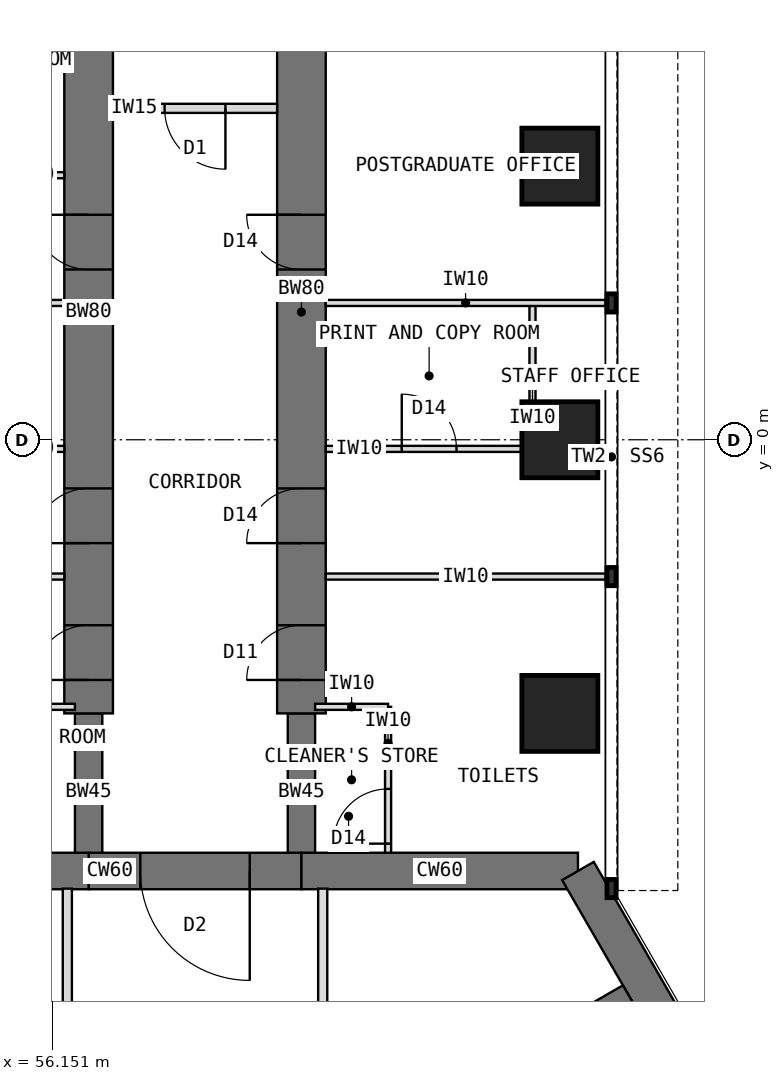
"""IFC4 building model, lengths in metres.
Left out: names, types, materials, properties, quantities, classifications, styles, units other than length and angle.
Written with IfcOpenShell. Run it as: python <this file> out.ifc"""

import sys

from ifc_helpers import new_model, si_unit, direction, frame, frame_2d, origin, origin_2d, place, context, subcontext, project, spatial, rectangle, extrude, element, fill, save


model = new_model("IFC4")
c1 = context("Model", 3, precision=1e-05, world=origin(), true_north=direction((0.0, 1.0)))
c2 = subcontext(c1, "Body", "Model", "MODEL_VIEW")
j1 = project(units=[si_unit("LENGTHUNIT", "METRE"), si_unit("PLANEANGLEUNIT", "RADIAN")], contexts=[c1])
p1 = place(None, origin())
s1 = spatial("IfcSite", under=j1, at=p1, CompositionType="ELEMENT")
p2 = place(p1, origin())
s2 = spatial("IfcBuilding", under=s1, at=p2, CompositionType="ELEMENT")
p3 = place(p2, frame((0.0, 0.0, 157.5)))
s3 = spatial("IfcBuildingStorey", under=s2, at=p3, CompositionType="ELEMENT", Elevation=157.5)
p4 = place(p3, frame((64.798, -7.092, 0.0), z_axis=(0.0, 0.0, 1.0), x_axis=(-1.0, 0.0, 0.0)))
e1 = element("IfcWall", 1, at=p4, inside=s3, PredefinedType="SHEAR", context=c2, shape_type="SweptSolid", body=[
    extrude(rectangle(XDim=4.548, YDim=0.6, at=frame_2d((2.274, 0.0))), origin(), (0.0, 0.0, 1.0), 4.0),
])
p5 = place(p3, frame((60.25, -7.092, 0.0), z_axis=(0.0, 0.0, 1.0), x_axis=(-1.0, 0.0, 0.0)))
e2 = element("IfcWall", 2, at=p5, inside=s3, PredefinedType="SHEAR", context=c2, shape_type="SweptSolid", body=[
    extrude(rectangle(XDim=3.5, YDim=0.6, at=frame_2d((1.75, 0.0))), origin(), (0.0, 0.0, 1.0), 4.0),
])
p6 = place(p5, frame((0.85, 0.0, 0.0)))
e3 = element("IfcOpeningElement", 3, at=p6, cuts=e2, PredefinedType="OPENING", context=c2, shape_type="SweptSolid", body=[
    extrude(rectangle(XDim=1.8, YDim=2.1, at=frame_2d((0.9, 1.05))), frame((0.0, 0.31, 0.0), z_axis=(0.0, -1.0, 0.0), x_axis=(1.0, 0.0, 0.0)), (0.0, 0.0, 1.0), 0.62),
])
p7 = place(p3, frame((56.75, -7.092, 0.0), z_axis=(0.0, 0.0, 1.0), x_axis=(-1.0, 0.0, 0.0)))
e4 = element("IfcWall", 4, at=p7, inside=s3, PredefinedType="SHEAR", context=c2, shape_type="SweptSolid", body=[
    extrude(rectangle(XDim=4.548, YDim=0.6, at=frame_2d((2.274, 0.0))), origin(), (0.0, 0.0, 1.0), 4.0),
])
p8 = place(p3, frame((71.096, -18.0, 0.0), z_axis=(0.0, 0.0, 1.0), x_axis=(-0.500005998175, 0.866021940709, 0.0)))
e5 = element("IfcWall", 5, at=p8, inside=s3, PredefinedType="SHEAR", context=c2, shape_type="SweptSolid", body=[
    extrude(rectangle(XDim=12.596, YDim=0.6, at=frame_2d((6.298, 0.0))), origin(), (0.0, 0.0, 1.0), 4.0),
])
p9 = place(p3, frame((56.75, -7.092, 0.0), z_axis=(0.0, 0.0, 1.0), x_axis=(0.0, 1.0, 0.0)))
e6 = element("IfcWall", 6, at=p9, inside=s3, PredefinedType="SHEAR", context=c2, shape_type="SweptSolid", body=[
    extrude(rectangle(XDim=2.592, YDim=0.45, at=frame_2d((1.296, 0.0))), origin(), (0.0, 0.0, 1.0), 4.0),
])
p10 = place(p3, frame((56.75, -4.5, 0.0), z_axis=(0.0, 0.0, 1.0), x_axis=(0.0, 1.0, 0.0)))
e7 = element("IfcWall", 7, at=p10, inside=s3, PredefinedType="SHEAR", context=c2, shape_type="SweptSolid", body=[
    extrude(rectangle(XDim=13.2, YDim=0.8, at=frame_2d((6.6, 0.0))), origin(), (0.0, 0.0, 1.0), 4.0),
])
p11 = place(p10, frame((0.55, 0.0, 0.0)))
e8 = element("IfcOpeningElement", 8, at=p11, cuts=e7, PredefinedType="OPENING", context=c2, shape_type="SweptSolid", body=[
    extrude(rectangle(XDim=0.9, YDim=2.1, at=frame_2d((0.45, 1.05))), frame((0.0, 0.41, 0.0), z_axis=(0.0, -1.0, 0.0), x_axis=(1.0, 0.0, 0.0)), (0.0, 0.0, 1.0), 0.82),
])
p12 = place(p10, frame((2.8, 0.0, 0.0)))
e9 = element("IfcOpeningElement", 9, at=p12, cuts=e7, PredefinedType="OPENING", context=c2, shape_type="SweptSolid", body=[
    extrude(rectangle(XDim=0.9, YDim=2.1, at=frame_2d((0.45, 1.05))), frame((0.0, 0.41, 0.0), z_axis=(0.0, -1.0, 0.0), x_axis=(1.0, 0.0, 0.0)), (0.0, 0.0, 1.0), 0.82),
])
p13 = place(p10, frame((7.3, 0.0, 0.0)))
e10 = element("IfcOpeningElement", 10, at=p13, cuts=e7, PredefinedType="OPENING", context=c2, shape_type="SweptSolid", body=[
    extrude(rectangle(XDim=0.9, YDim=2.1, at=frame_2d((0.45, 1.05))), frame((0.0, 0.41, 0.0), z_axis=(0.0, -1.0, 0.0), x_axis=(1.0, 0.0, 0.0)), (0.0, 0.0, 1.0), 0.82),
])
p14 = place(p3, frame((60.25, -7.092, 0.0), z_axis=(0.0, 0.0, 1.0), x_axis=(0.0, 1.0, 0.0)))
e11 = element("IfcWall", 11, at=p14, inside=s3, PredefinedType="SHEAR", context=c2, shape_type="SweptSolid", body=[
    extrude(rectangle(XDim=2.592, YDim=0.45, at=frame_2d((1.296, 0.0))), origin(), (0.0, 0.0, 1.0), 4.0),
])
p15 = place(p3, frame((60.25, -4.5, 0.0), z_axis=(0.0, 0.0, 1.0), x_axis=(0.0, 1.0, 0.0)))
e12 = element("IfcWall", 12, at=p15, inside=s3, PredefinedType="SHEAR", context=c2, shape_type="SweptSolid", body=[
    extrude(rectangle(XDim=13.2, YDim=0.8, at=frame_2d((6.6, 0.0))), origin(), (0.0, 0.0, 1.0), 4.0),
])
p16 = place(p15, frame((0.55, 0.0, 0.0)))
e13 = element("IfcOpeningElement", 13, at=p16, cuts=e12, PredefinedType="OPENING", context=c2, shape_type="SweptSolid", body=[
    extrude(rectangle(XDim=0.9, YDim=2.1, at=frame_2d((0.45, 1.05))), frame((0.0, 0.41, 0.0), z_axis=(0.0, -1.0, 0.0), x_axis=(1.0, 0.0, 0.0)), (0.0, 0.0, 1.0), 0.82),
])
p17 = place(p15, frame((2.8, 0.0, 0.0)))
e14 = element("IfcOpeningElement", 14, at=p17, cuts=e12, PredefinedType="OPENING", context=c2, shape_type="SweptSolid", body=[
    extrude(rectangle(XDim=0.9, YDim=2.1, at=frame_2d((0.45, 1.05))), frame((0.0, 0.41, 0.0), z_axis=(0.0, -1.0, 0.0), x_axis=(1.0, 0.0, 0.0)), (0.0, 0.0, 1.0), 0.82),
])
p18 = place(p15, frame((7.3, 0.0, 0.0)))
e15 = element("IfcOpeningElement", 15, at=p18, cuts=e12, PredefinedType="OPENING", context=c2, shape_type="SweptSolid", body=[
    extrude(rectangle(XDim=0.9, YDim=2.1, at=frame_2d((0.45, 1.05))), frame((0.0, 0.41, 0.0), z_axis=(0.0, -1.0, 0.0), x_axis=(1.0, 0.0, 0.0)), (0.0, 0.0, 1.0), 0.82),
])
for number, where, z_axis, x_axis in (
    (16, (64.5, -4.5, 0.0), (0.0, 0.0, 1.0), (1.0, 0.0, 0.0)),
    (17, (64.5, 0.0, 0.0), (0.0, 0.0, 1.0), (1.0, 0.0, 0.0)),
    (18, (64.5, 4.5, 0.0), (0.0, 0.0, 1.0), (1.0, 0.0, 0.0)),
):
    element("IfcColumn", number, at=place(p3, frame(where, z_axis=z_axis, x_axis=x_axis)), inside=s3, PredefinedType="COLUMN", context=c2, shape_type="SweptSolid", body=[
        extrude(rectangle(XDim=1.25, YDim=1.25, at=origin_2d()), origin(), (0.0, 0.0, 1.0), 4.0),
    ])
for number, where, z_axis, x_axis in (
    (19, (56.48, -12.099, 0.0), (0.0, 0.0, 1.0), (-0.866, 0.5, 0.0)),
    (20, (60.52, -12.099, 0.0), (0.0, 0.0, 1.0), (0.866, 0.5, 0.0)),
):
    element("IfcWall", number, at=place(p3, frame(where, z_axis=z_axis, x_axis=x_axis)), inside=s3, PredefinedType="SHEAR", context=c2, shape_type="SweptSolid", body=[
        extrude(rectangle(XDim=5.908, YDim=0.4, at=frame_2d((2.954, 0.0))), origin(), (0.0, 0.0, 1.0), 4.0),
    ])
for number, where, z_axis, x_axis in (
    (21, (56.35, -2.25, 0.0), (0.0, 0.0, 1.0), (-1.0, 0.0, 0.0)),
    (22, (56.35, 2.25, 0.0), (0.0, 0.0, 1.0), (-1.0, 0.0, 0.0)),
):
    element("IfcWall", number, at=place(p3, frame(where, z_axis=z_axis, x_axis=x_axis)), inside=s3, PredefinedType="PARTITIONING", context=c2, shape_type="SweptSolid", body=[
        extrude(rectangle(XDim=4.6, YDim=0.1, at=frame_2d((2.3, 0.0))), origin(), (0.0, 0.0, 1.0), 3.8),
    ])
p19 = place(p3, frame((56.35, -0.15, 0.0), z_axis=(0.0, 0.0, 1.0), x_axis=(-1.0, 0.0, 0.0)))
e23 = element("IfcWall", 23, at=p19, inside=s3, PredefinedType="PARTITIONING", context=c2, shape_type="SweptSolid", body=[
    extrude(rectangle(XDim=3.4, YDim=0.1, at=frame_2d((1.7, 0.0))), origin(), (0.0, 0.0, 1.0), 3.8),
])
p20 = place(p19, frame((1.25, 0.0, 0.0)))
e24 = element("IfcOpeningElement", 24, at=p20, cuts=e23, PredefinedType="OPENING", context=c2, shape_type="SweptSolid", body=[
    extrude(rectangle(XDim=0.9, YDim=2.1, at=frame_2d((0.45, 1.05))), frame((0.0, 0.06, 0.0), z_axis=(0.0, -1.0, 0.0), x_axis=(1.0, 0.0, 0.0)), (0.0, 0.0, 1.0), 0.12),
])
p21 = place(p3, frame((56.35, 4.35, 0.0), z_axis=(0.0, 0.0, 1.0), x_axis=(-1.0, 0.0, 0.0)))
e25 = element("IfcWall", 25, at=p21, inside=s3, PredefinedType="PARTITIONING", context=c2, shape_type="SweptSolid", body=[
    extrude(rectangle(XDim=3.4, YDim=0.1, at=frame_2d((1.7, 0.0))), origin(), (0.0, 0.0, 1.0), 3.8),
])
p22 = place(p21, frame((1.25, 0.0, 0.0)))
e26 = element("IfcOpeningElement", 26, at=p22, cuts=e25, PredefinedType="OPENING", context=c2, shape_type="SweptSolid", body=[
    extrude(rectangle(XDim=0.9, YDim=2.1, at=frame_2d((0.45, 1.05))), frame((0.0, 0.06, 0.0), z_axis=(0.0, -1.0, 0.0), x_axis=(1.0, 0.0, 0.0)), (0.0, 0.0, 1.0), 0.12),
])
p23 = place(p3, frame((56.525, -4.392, 0.0), z_axis=(0.0, 0.0, 1.0), x_axis=(-1.0, 0.0, 0.0)))
e27 = element("IfcWall", 27, at=p23, inside=s3, PredefinedType="PARTITIONING", context=c2, shape_type="SweptSolid", body=[
    extrude(rectangle(XDim=3.2, YDim=0.1, at=frame_2d((1.6, 0.0))), origin(), (0.0, 0.0, 1.0), 3.8),
])
for number, where, z_axis, x_axis in (
    (28, (60.65, -2.25, 0.0), (0.0, 0.0, 1.0), (1.0, 0.0, 0.0)),
    (29, (60.65, 2.25, 0.0), (0.0, 0.0, 1.0), (1.0, 0.0, 0.0)),
):
    element("IfcWall", number, at=place(p3, frame(where, z_axis=z_axis, x_axis=x_axis)), inside=s3, PredefinedType="PARTITIONING", context=c2, shape_type="SweptSolid", body=[
        extrude(rectangle(XDim=4.6, YDim=0.1, at=frame_2d((2.3, 0.0))), origin(), (0.0, 0.0, 1.0), 3.8),
    ])
p24 = place(p3, frame((64.05, -0.15, 0.0), z_axis=(0.0, 0.0, 1.0), x_axis=(0.0, 1.0, 0.0)))
e30 = element("IfcWall", 30, at=p24, inside=s3, PredefinedType="PARTITIONING", context=c2, shape_type="SweptSolid", body=[
    extrude(rectangle(XDim=2.4, YDim=0.1, at=frame_2d((1.2, 0.0))), origin(), (0.0, 0.0, 1.0), 3.8),
])
p25 = place(p3, frame((60.65, -0.15, 0.0), z_axis=(0.0, 0.0, 1.0), x_axis=(1.0, 0.0, 0.0)))
e31 = element("IfcWall", 31, at=p25, inside=s3, PredefinedType="PARTITIONING", context=c2, shape_type="SweptSolid", body=[
    extrude(rectangle(XDim=3.4, YDim=0.1, at=frame_2d((1.7, 0.0))), origin(), (0.0, 0.0, 1.0), 3.8),
])
p26 = place(p25, frame((1.25, 0.0, 0.0)))
e32 = element("IfcOpeningElement", 32, at=p26, cuts=e31, PredefinedType="OPENING", context=c2, shape_type="SweptSolid", body=[
    extrude(rectangle(XDim=0.9, YDim=2.1, at=frame_2d((0.45, 1.05))), frame((0.0, 0.06, 0.0), z_axis=(0.0, -1.0, 0.0), x_axis=(1.0, 0.0, 0.0)), (0.0, 0.0, 1.0), 0.12),
])
p27 = place(p3, frame((61.675, -6.792, 0.0), z_axis=(0.0, 0.0, 1.0), x_axis=(0.0, 1.0, 0.0)))
e33 = element("IfcWall", 33, at=p27, inside=s3, PredefinedType="PARTITIONING", context=c2, shape_type="SweptSolid", body=[
    extrude(rectangle(XDim=2.4, YDim=0.1, at=frame_2d((1.2, 0.0))), origin(), (0.0, 0.0, 1.0), 3.8),
])
p28 = place(p27, frame((0.15, 0.0, 0.0)))
e34 = element("IfcOpeningElement", 34, at=p28, cuts=e33, PredefinedType="OPENING", context=c2, shape_type="SweptSolid", body=[
    extrude(rectangle(XDim=0.9, YDim=2.1, at=frame_2d((0.45, 1.05))), frame((0.0, 0.06, 0.0), z_axis=(0.0, -1.0, 0.0), x_axis=(1.0, 0.0, 0.0)), (0.0, 0.0, 1.0), 0.12),
])
p29 = place(p3, frame((60.475, -4.392, 0.0), z_axis=(0.0, 0.0, 1.0), x_axis=(1.0, 0.0, 0.0)))
e35 = element("IfcWall", 35, at=p29, inside=s3, PredefinedType="PARTITIONING", context=c2, shape_type="SweptSolid", body=[
    extrude(rectangle(XDim=1.2, YDim=0.1, at=frame_2d((0.6, 0.0))), origin(), (0.0, 0.0, 1.0), 3.8),
])
p30 = place(p3, frame((56.4, -11.857, 0.0), z_axis=(0.0, 0.0, 1.0), x_axis=(0.0, 1.0, 0.0)))
e36 = element("IfcWall", 36, at=p30, inside=s3, PredefinedType="PARTITIONING", context=c2, shape_type="SweptSolid", body=[
    extrude(rectangle(XDim=4.476, YDim=0.15, at=frame_2d((2.238, 0.0))), origin(), (0.0, 0.0, 1.0), 3.8),
])
p31 = place(p30, frame((0.843, 0.0, 0.0)))
e37 = element("IfcOpeningElement", 37, at=p31, cuts=e36, PredefinedType="OPENING", context=c2, shape_type="SweptSolid", body=[
    extrude(rectangle(XDim=1.0, YDim=2.1, at=frame_2d((0.5, 1.05))), frame((0.0, 0.085, 0.0), z_axis=(0.0, -1.0, 0.0), x_axis=(1.0, 0.0, 0.0)), (0.0, 0.0, 1.0), 0.17),
])
p32 = place(p3, frame((60.6, -7.382, 0.0), z_axis=(0.0, 0.0, 1.0), x_axis=(0.0, -1.0, 0.0)))
e38 = element("IfcWall", 38, at=p32, inside=s3, PredefinedType="PARTITIONING", context=c2, shape_type="SweptSolid", body=[
    extrude(rectangle(XDim=4.476, YDim=0.15, at=frame_2d((2.238, 0.0))), origin(), (0.0, 0.0, 1.0), 3.8),
])
p33 = place(p32, frame((2.633, 0.0, 0.0)))
e39 = element("IfcOpeningElement", 39, at=p33, cuts=e38, PredefinedType="OPENING", context=c2, shape_type="SweptSolid", body=[
    extrude(rectangle(XDim=1.0, YDim=2.1, at=frame_2d((0.5, 1.05))), frame((0.0, 0.085, 0.0), z_axis=(0.0, -1.0, 0.0), x_axis=(1.0, 0.0, 0.0)), (0.0, 0.0, 1.0), 0.17),
])
p34 = place(p3, frame((59.85, 5.45, 0.0), z_axis=(0.0, 0.0, 1.0), x_axis=(-1.0, 0.0, 0.0)))
e40 = element("IfcWall", 40, at=p34, inside=s3, PredefinedType="PARTITIONING", context=c2, shape_type="SweptSolid", body=[
    extrude(rectangle(XDim=2.7, YDim=0.15, at=frame_2d((1.35, 0.0))), origin(), (0.0, 0.0, 1.0), 3.8),
])
p35 = place(p34, frame((0.85, 0.0, 0.0)))
e41 = element("IfcOpeningElement", 41, at=p35, cuts=e40, PredefinedType="OPENING", context=c2, shape_type="SweptSolid", body=[
    extrude(rectangle(XDim=1.0, YDim=2.1, at=frame_2d((0.5, 1.05))), frame((0.0, 0.085, 0.0), z_axis=(0.0, -1.0, 0.0), x_axis=(1.0, 0.0, 0.0)), (0.0, 0.0, 1.0), 0.17),
])
p36 = place(p6, origin())
e42 = element("IfcDoor", 42, at=p36, inside=s3, OperationType="DOUBLE_DOOR_DOUBLE_SWING", PredefinedType="DOOR", context=c2, shape_type="SweptSolid", body=[
    extrude(rectangle(XDim=1.72, YDim=2.06, at=frame_2d((0.9, 1.03))), frame((0.0, 0.025, 0.0), z_axis=(0.0, -1.0, 0.0), x_axis=(1.0, 0.0, 0.0)), (0.0, 0.0, 1.0), 0.05),
    extrude(rectangle(XDim=0.04, YDim=2.1, at=frame_2d((0.02, 1.05))), frame((0.0, 0.3, 0.0), z_axis=(0.0, -1.0, 0.0), x_axis=(1.0, 0.0, 0.0)), (0.0, 0.0, 1.0), 0.6),
    extrude(rectangle(XDim=0.04, YDim=2.1, at=frame_2d((1.78, 1.05))), frame((0.0, 0.3, 0.0), z_axis=(0.0, -1.0, 0.0), x_axis=(1.0, 0.0, 0.0)), (0.0, 0.0, 1.0), 0.6),
    extrude(rectangle(XDim=1.72, YDim=0.04, at=frame_2d((0.9, 2.08))), frame((0.0, 0.3, 0.0), z_axis=(0.0, -1.0, 0.0), x_axis=(1.0, 0.0, 0.0)), (0.0, 0.0, 1.0), 0.6),
])
fill(e3, e42)
p37 = place(p26, origin())
e43 = element("IfcDoor", 43, at=p37, inside=s3, OperationType="SINGLE_SWING_LEFT", PredefinedType="DOOR", context=c2, shape_type="SweptSolid", body=[
    extrude(rectangle(XDim=0.9, YDim=2.1, at=frame_2d((0.45, 1.05))), frame((0.0, 0.025, 0.0), z_axis=(0.0, -1.0, 0.0), x_axis=(1.0, 0.0, 0.0)), (0.0, 0.0, 1.0), 0.05),
])
fill(e32, e43)
p38 = place(p28, origin())
e44 = element("IfcDoor", 44, at=p38, inside=s3, OperationType="SINGLE_SWING_LEFT", PredefinedType="DOOR", context=c2, shape_type="SweptSolid", body=[
    extrude(rectangle(XDim=0.9, YDim=2.1, at=frame_2d((0.45, 1.05))), frame((0.0, 0.025, 0.0), z_axis=(0.0, -1.0, 0.0), x_axis=(1.0, 0.0, 0.0)), (0.0, 0.0, 1.0), 0.05),
])
fill(e34, e44)
p39 = place(p35, origin())
e45 = element("IfcDoor", 45, at=p39, inside=s3, OperationType="SINGLE_SWING_LEFT", PredefinedType="DOOR", context=c2, shape_type="SweptSolid", body=[
    extrude(rectangle(XDim=1.0, YDim=2.1, at=frame_2d((0.5, 1.05))), frame((0.0, 0.025, 0.0), z_axis=(0.0, -1.0, 0.0), x_axis=(1.0, 0.0, 0.0)), (0.0, 0.0, 1.0), 0.05),
])
fill(e41, e45)
p40 = place(p11, origin())
e46 = element("IfcDoor", 46, at=p40, inside=s3, OperationType="SINGLE_SWING_LEFT", PredefinedType="DOOR", context=c2, shape_type="SweptSolid", body=[
    extrude(rectangle(XDim=0.82, YDim=2.06, at=frame_2d((0.45, 1.03))), frame((0.0, 0.025, 0.0), z_axis=(0.0, -1.0, 0.0), x_axis=(1.0, 0.0, 0.0)), (0.0, 0.0, 1.0), 0.05),
    extrude(rectangle(XDim=0.04, YDim=2.1, at=frame_2d((0.02, 1.05))), frame((0.0, 0.4, 0.0), z_axis=(0.0, -1.0, 0.0), x_axis=(1.0, 0.0, 0.0)), (0.0, 0.0, 1.0), 0.8),
    extrude(rectangle(XDim=0.04, YDim=2.1, at=frame_2d((0.88, 1.05))), frame((0.0, 0.4, 0.0), z_axis=(0.0, -1.0, 0.0), x_axis=(1.0, 0.0, 0.0)), (0.0, 0.0, 1.0), 0.8),
    extrude(rectangle(XDim=0.82, YDim=0.04, at=frame_2d((0.45, 2.08))), frame((0.0, 0.4, 0.0), z_axis=(0.0, -1.0, 0.0), x_axis=(1.0, 0.0, 0.0)), (0.0, 0.0, 1.0), 0.8),
])
fill(e8, e46)
p41 = place(p12, origin())
e47 = element("IfcDoor", 47, at=p41, inside=s3, OperationType="SINGLE_SWING_LEFT", PredefinedType="DOOR", context=c2, shape_type="SweptSolid", body=[
    extrude(rectangle(XDim=0.82, YDim=2.06, at=frame_2d((0.45, 1.03))), frame((0.0, 0.025, 0.0), z_axis=(0.0, -1.0, 0.0), x_axis=(1.0, 0.0, 0.0)), (0.0, 0.0, 1.0), 0.05),
    extrude(rectangle(XDim=0.04, YDim=2.1, at=frame_2d((0.02, 1.05))), frame((0.0, 0.4, 0.0), z_axis=(0.0, -1.0, 0.0), x_axis=(1.0, 0.0, 0.0)), (0.0, 0.0, 1.0), 0.8),
    extrude(rectangle(XDim=0.04, YDim=2.1, at=frame_2d((0.88, 1.05))), frame((0.0, 0.4, 0.0), z_axis=(0.0, -1.0, 0.0), x_axis=(1.0, 0.0, 0.0)), (0.0, 0.0, 1.0), 0.8),
    extrude(rectangle(XDim=0.82, YDim=0.04, at=frame_2d((0.45, 2.08))), frame((0.0, 0.4, 0.0), z_axis=(0.0, -1.0, 0.0), x_axis=(1.0, 0.0, 0.0)), (0.0, 0.0, 1.0), 0.8),
])
fill(e9, e47)
p42 = place(p13, origin())
e48 = element("IfcDoor", 48, at=p42, inside=s3, OperationType="SINGLE_SWING_RIGHT", PredefinedType="DOOR", context=c2, shape_type="SweptSolid", body=[
    extrude(rectangle(XDim=0.82, YDim=2.06, at=frame_2d((0.45, 1.03))), frame((0.0, 0.025, 0.0), z_axis=(0.0, -1.0, 0.0), x_axis=(1.0, 0.0, 0.0)), (0.0, 0.0, 1.0), 0.05),
    extrude(rectangle(XDim=0.04, YDim=2.1, at=frame_2d((0.02, 1.05))), frame((0.0, 0.4, 0.0), z_axis=(0.0, -1.0, 0.0), x_axis=(1.0, 0.0, 0.0)), (0.0, 0.0, 1.0), 0.8),
    extrude(rectangle(XDim=0.04, YDim=2.1, at=frame_2d((0.88, 1.05))), frame((0.0, 0.4, 0.0), z_axis=(0.0, -1.0, 0.0), x_axis=(1.0, 0.0, 0.0)), (0.0, 0.0, 1.0), 0.8),
    extrude(rectangle(XDim=0.82, YDim=0.04, at=frame_2d((0.45, 2.08))), frame((0.0, 0.4, 0.0), z_axis=(0.0, -1.0, 0.0), x_axis=(1.0, 0.0, 0.0)), (0.0, 0.0, 1.0), 0.8),
])
fill(e10, e48)
p43 = place(p16, origin())
e49 = element("IfcDoor", 49, at=p43, inside=s3, OperationType="SINGLE_SWING_LEFT", PredefinedType="DOOR", context=c2, shape_type="SweptSolid", body=[
    extrude(rectangle(XDim=0.82, YDim=2.06, at=frame_2d((0.45, 1.03))), frame((0.0, 0.025, 0.0), z_axis=(0.0, -1.0, 0.0), x_axis=(1.0, 0.0, 0.0)), (0.0, 0.0, 1.0), 0.05),
    extrude(rectangle(XDim=0.04, YDim=2.1, at=frame_2d((0.02, 1.05))), frame((0.0, 0.4, 0.0), z_axis=(0.0, -1.0, 0.0), x_axis=(1.0, 0.0, 0.0)), (0.0, 0.0, 1.0), 0.8),
    extrude(rectangle(XDim=0.04, YDim=2.1, at=frame_2d((0.88, 1.05))), frame((0.0, 0.4, 0.0), z_axis=(0.0, -1.0, 0.0), x_axis=(1.0, 0.0, 0.0)), (0.0, 0.0, 1.0), 0.8),
    extrude(rectangle(XDim=0.82, YDim=0.04, at=frame_2d((0.45, 2.08))), frame((0.0, 0.4, 0.0), z_axis=(0.0, -1.0, 0.0), x_axis=(1.0, 0.0, 0.0)), (0.0, 0.0, 1.0), 0.8),
])
fill(e13, e49)
p44 = place(p17, origin())
e50 = element("IfcDoor", 50, at=p44, inside=s3, OperationType="SINGLE_SWING_LEFT", PredefinedType="DOOR", context=c2, shape_type="SweptSolid", body=[
    extrude(rectangle(XDim=0.82, YDim=2.06, at=frame_2d((0.45, 1.03))), frame((0.0, 0.025, 0.0), z_axis=(0.0, -1.0, 0.0), x_axis=(1.0, 0.0, 0.0)), (0.0, 0.0, 1.0), 0.05),
    extrude(rectangle(XDim=0.04, YDim=2.1, at=frame_2d((0.02, 1.05))), frame((0.0, 0.4, 0.0), z_axis=(0.0, -1.0, 0.0), x_axis=(1.0, 0.0, 0.0)), (0.0, 0.0, 1.0), 0.8),
    extrude(rectangle(XDim=0.04, YDim=2.1, at=frame_2d((0.88, 1.05))), frame((0.0, 0.4, 0.0), z_axis=(0.0, -1.0, 0.0), x_axis=(1.0, 0.0, 0.0)), (0.0, 0.0, 1.0), 0.8),
    extrude(rectangle(XDim=0.82, YDim=0.04, at=frame_2d((0.45, 2.08))), frame((0.0, 0.4, 0.0), z_axis=(0.0, -1.0, 0.0), x_axis=(1.0, 0.0, 0.0)), (0.0, 0.0, 1.0), 0.8),
])
fill(e14, e50)
p45 = place(p18, origin())
e51 = element("IfcDoor", 51, at=p45, inside=s3, OperationType="SINGLE_SWING_RIGHT", PredefinedType="DOOR", context=c2, shape_type="SweptSolid", body=[
    extrude(rectangle(XDim=0.82, YDim=2.06, at=frame_2d((0.45, 1.03))), frame((0.0, 0.025, 0.0), z_axis=(0.0, -1.0, 0.0), x_axis=(1.0, 0.0, 0.0)), (0.0, 0.0, 1.0), 0.05),
    extrude(rectangle(XDim=0.04, YDim=2.1, at=frame_2d((0.02, 1.05))), frame((0.0, 0.4, 0.0), z_axis=(0.0, -1.0, 0.0), x_axis=(1.0, 0.0, 0.0)), (0.0, 0.0, 1.0), 0.8),
    extrude(rectangle(XDim=0.04, YDim=2.1, at=frame_2d((0.88, 1.05))), frame((0.0, 0.4, 0.0), z_axis=(0.0, -1.0, 0.0), x_axis=(1.0, 0.0, 0.0)), (0.0, 0.0, 1.0), 0.8),
    extrude(rectangle(XDim=0.82, YDim=0.04, at=frame_2d((0.45, 2.08))), frame((0.0, 0.4, 0.0), z_axis=(0.0, -1.0, 0.0), x_axis=(1.0, 0.0, 0.0)), (0.0, 0.0, 1.0), 0.8),
])
fill(e15, e51)
save(model, sys.argv[1])
